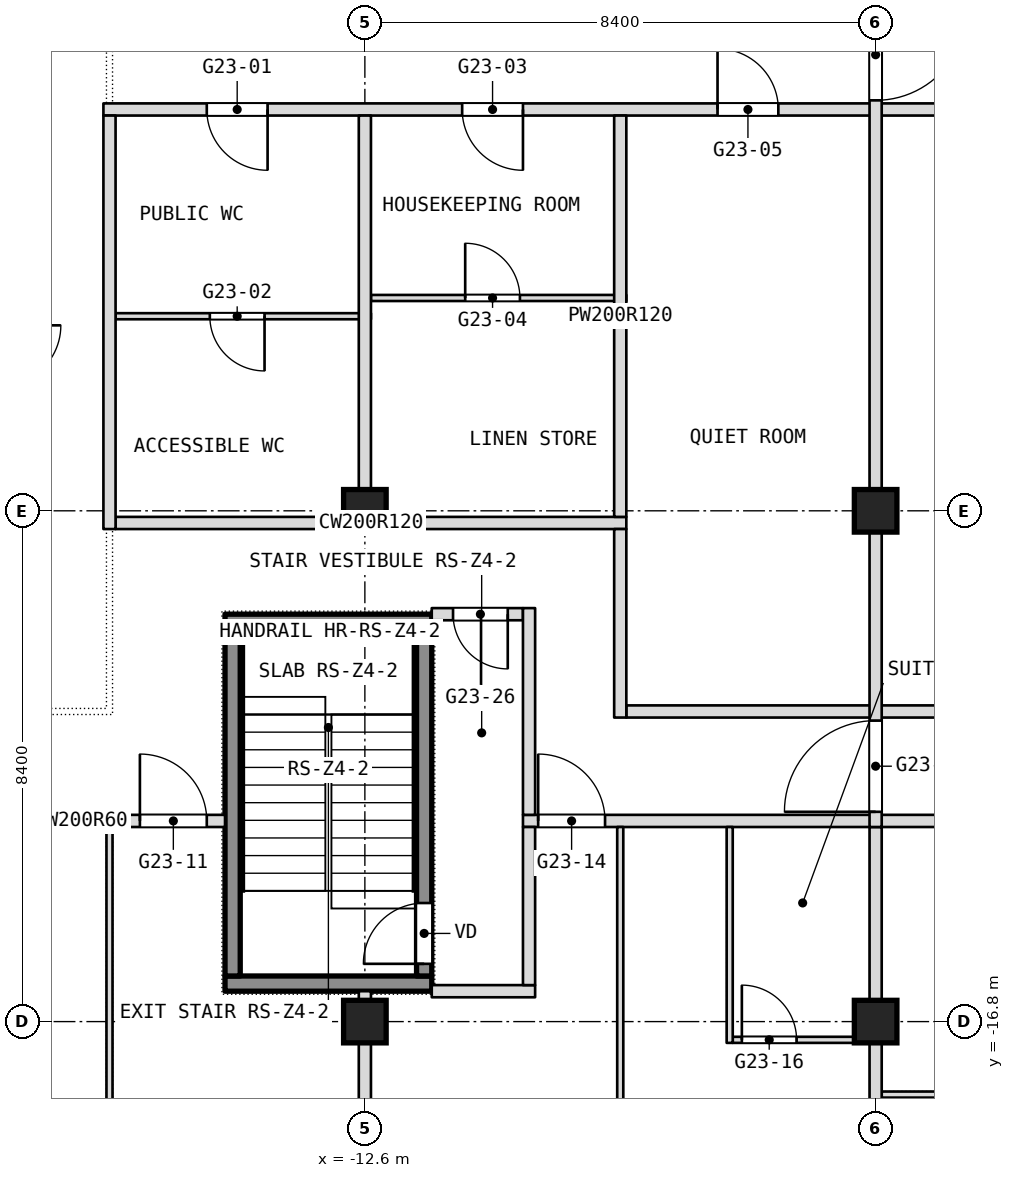
"""IFC4 building model, lengths in metres.
Left out: names, types, materials, properties, quantities, classifications, styles, units other than length and angle.
Written with IfcOpenShell. Run it as: python <this file> out.ifc"""

import sys

from ifc_helpers import new_model, si_unit, direction, frame, frame_2d, origin, origin_2d, place, context, subcontext, project, spatial, rectangle, extrude, element, fill, save


model = new_model("IFC4")
c1 = context("Model", 3, precision=1e-05, world=origin(), true_north=direction((0.0, 1.0)))
c2 = subcontext(c1, "Body", "Model", "MODEL_VIEW")
j1 = project(units=[si_unit("LENGTHUNIT", "METRE"), si_unit("PLANEANGLEUNIT", "RADIAN")], contexts=[c1])
p1 = place(None, origin())
s1 = spatial("IfcSite", under=j1, at=p1, CompositionType="ELEMENT")
p2 = place(p1, origin())
s2 = spatial("IfcBuilding", under=s1, at=p2, CompositionType="ELEMENT")
p3 = place(p2, frame((0.0, 0.0, 274.1)))
s3 = spatial("IfcBuildingStorey", under=s2, at=p3, CompositionType="ELEMENT", Elevation=274.1)
for number, where, z_axis, x_axis in (
    (1, (-12.6, -16.8, 0.0), (0.0, 0.0, 1.0), (1.0, 0.0, 0.0)),
    (2, (-12.6, -8.4, 0.0), (0.0, 0.0, 1.0), (1.0, 0.0, 0.0)),
    (3, (-4.2, -16.8, 0.0), (0.0, 0.0, 1.0), (1.0, 0.0, 0.0)),
    (4, (-4.2, -8.4, 0.0), (0.0, 0.0, 1.0), (1.0, 0.0, 0.0)),
):
    element("IfcColumn", number, at=place(p3, frame(where, z_axis=z_axis, x_axis=x_axis)), inside=s3, PredefinedType="COLUMN", context=c2, shape_type="SweptSolid", body=[
        extrude(rectangle(XDim=0.7, YDim=0.7, at=origin_2d()), origin(), (0.0, 0.0, 1.0), 3.6),
    ])
p4 = place(p3, frame((-4.1, -18.0, 0.0), z_axis=(0.0, 0.0, 1.0), x_axis=(1.0, 0.0, 0.0)))
e5 = element("IfcWall", 5, at=p4, inside=s3, PredefinedType="PARTITIONING", context=c2, shape_type="SweptSolid", body=[
    extrude(rectangle(XDim=3.55, YDim=0.1, at=frame_2d((1.775, 0.0))), origin(), (0.0, 0.0, 1.0), 3.34),
])
p5 = place(p3, frame((-6.55, -17.1, 0.0), z_axis=(0.0, 0.0, 1.0), x_axis=(1.0, 0.0, 0.0)))
e6 = element("IfcWall", 6, at=p5, inside=s3, PredefinedType="PARTITIONING", context=c2, shape_type="SweptSolid", body=[
    extrude(rectangle(XDim=2.45, YDim=0.1, at=frame_2d((1.225, 0.0))), origin(), (0.0, 0.0, 1.0), 3.34),
])
p6 = place(p5, frame((0.15, 0.0, 0.0)))
e7 = element("IfcOpeningElement", 7, at=p6, cuts=e6, PredefinedType="OPENING", context=c2, shape_type="SweptSolid", body=[
    extrude(rectangle(XDim=0.9, YDim=2.1, at=frame_2d((0.45, 1.05))), frame((0.0, 0.05, 0.0), z_axis=(0.0, -1.0, 0.0), x_axis=(1.0, 0.0, 0.0)), (0.0, 0.0, 1.0), 0.1),
])
p7 = place(p3, frame((-11.5, -16.3, 0.0), z_axis=(0.0, 0.0, 1.0), x_axis=(1.0, 0.0, 0.0)))
e8 = element("IfcWall", 8, at=p7, inside=s3, PredefinedType="PARTITIONING", context=c2, shape_type="SweptSolid", body=[
    extrude(rectangle(XDim=1.7, YDim=0.2, at=frame_2d((0.85, 0.0))), origin(), (0.0, 0.0, 1.0), 3.34),
])
p8 = place(p3, frame((-21.0, -13.5, 0.0), z_axis=(0.0, 0.0, 1.0), x_axis=(1.0, 0.0, 0.0)))
e9 = element("IfcWall", 9, at=p8, inside=s3, PredefinedType="PARTITIONING", context=c2, shape_type="SweptSolid", body=[
    extrude(rectangle(XDim=6.1, YDim=0.2, at=frame_2d((3.05, 0.0))), origin(), (0.0, 0.0, 1.0), 3.34),
])
p9 = place(p8, frame((4.7, 0.0, 0.0)))
e10 = element("IfcOpeningElement", 10, at=p9, cuts=e9, PredefinedType="OPENING", context=c2, shape_type="SweptSolid", body=[
    extrude(rectangle(XDim=1.1, YDim=2.1, at=frame_2d((0.55, 1.05))), frame((0.0, 0.1, 0.0), z_axis=(0.0, -1.0, 0.0), x_axis=(1.0, 0.0, 0.0)), (0.0, 0.0, 1.0), 0.2),
])
p10 = place(p3, frame((-10.0, -13.5, 0.0), z_axis=(0.0, 0.0, 1.0), x_axis=(1.0, 0.0, 0.0)))
e11 = element("IfcWall", 11, at=p10, inside=s3, PredefinedType="PARTITIONING", context=c2, shape_type="SweptSolid", body=[
    extrude(rectangle(XDim=16.0, YDim=0.2, at=frame_2d((8.0, 0.0))), origin(), (0.0, 0.0, 1.0), 3.34),
])
p11 = place(p10, frame((0.25, 0.0, 0.0)))
e12 = element("IfcOpeningElement", 12, at=p11, cuts=e11, PredefinedType="OPENING", context=c2, shape_type="SweptSolid", body=[
    extrude(rectangle(XDim=1.1, YDim=2.1, at=frame_2d((0.55, 1.05))), frame((0.0, 0.1, 0.0), z_axis=(0.0, -1.0, 0.0), x_axis=(1.0, 0.0, 0.0)), (0.0, 0.0, 1.0), 0.2),
])
p12 = place(p10, frame((9.5, 0.0, 0.0)))
e13 = element("IfcOpeningElement", 13, at=p12, cuts=e11, PredefinedType="OPENING", context=c2, shape_type="SweptSolid", body=[
    extrude(rectangle(XDim=1.1, YDim=2.1, at=frame_2d((0.55, 1.05))), frame((0.0, 0.1, 0.0), z_axis=(0.0, -1.0, 0.0), x_axis=(1.0, 0.0, 0.0)), (0.0, 0.0, 1.0), 0.2),
])
p13 = place(p3, frame((-8.3, -11.7, 0.0), z_axis=(0.0, 0.0, 1.0), x_axis=(1.0, 0.0, 0.0)))
e14 = element("IfcWall", 14, at=p13, inside=s3, PredefinedType="PARTITIONING", context=c2, shape_type="SweptSolid", body=[
    extrude(rectangle(XDim=25.0, YDim=0.2, at=frame_2d((12.5, 0.0))), origin(), (0.0, 0.0, 1.0), 3.34),
])
p14 = place(p3, frame((-11.5, -10.1, 0.0), z_axis=(0.0, 0.0, 1.0), x_axis=(1.0, 0.0, 0.0)))
e15 = element("IfcWall", 15, at=p14, inside=s3, PredefinedType="PARTITIONING", context=c2, shape_type="SweptSolid", body=[
    extrude(rectangle(XDim=1.5, YDim=0.2, at=frame_2d((0.75, 0.0))), origin(), (0.0, 0.0, 1.0), 3.34),
])
p15 = place(p14, frame((0.35, 0.0, 0.0)))
e16 = element("IfcOpeningElement", 16, at=p15, cuts=e15, PredefinedType="OPENING", context=c2, shape_type="SweptSolid", body=[
    extrude(rectangle(XDim=0.9, YDim=2.1, at=frame_2d((0.45, 1.05))), frame((0.0, 0.1, 0.0), z_axis=(0.0, -1.0, 0.0), x_axis=(1.0, 0.0, 0.0)), (0.0, 0.0, 1.0), 0.2),
])
p16 = place(p3, frame((-16.7, -8.6, 0.0), z_axis=(0.0, 0.0, 1.0), x_axis=(1.0, 0.0, 0.0)))
e17 = element("IfcWall", 17, at=p16, inside=s3, PredefinedType="PARTITIONING", context=c2, shape_type="SweptSolid", body=[
    extrude(rectangle(XDim=8.4, YDim=0.2, at=frame_2d((4.2, 0.0))), origin(), (0.0, 0.0, 1.0), 3.34),
])
p17 = place(p3, frame((-16.7, -5.2, 0.0), z_axis=(0.0, 0.0, 1.0), x_axis=(1.0, 0.0, 0.0)))
e18 = element("IfcWall", 18, at=p17, inside=s3, PredefinedType="PARTITIONING", context=c2, shape_type="SweptSolid", body=[
    extrude(rectangle(XDim=4.2, YDim=0.1, at=frame_2d((2.1, 0.0))), origin(), (0.0, 0.0, 1.0), 3.34),
])
p18 = place(p17, frame((1.55, 0.0, 0.0)))
e19 = element("IfcOpeningElement", 19, at=p18, cuts=e18, PredefinedType="OPENING", context=c2, shape_type="SweptSolid", body=[
    extrude(rectangle(XDim=0.9, YDim=2.1, at=frame_2d((0.45, 1.05))), frame((0.0, 0.05, 0.0), z_axis=(0.0, -1.0, 0.0), x_axis=(1.0, 0.0, 0.0)), (0.0, 0.0, 1.0), 0.1),
])
p19 = place(p3, frame((-12.5, -4.9, 0.0), z_axis=(0.0, 0.0, 1.0), x_axis=(1.0, 0.0, 0.0)))
e20 = element("IfcWall", 20, at=p19, inside=s3, PredefinedType="PARTITIONING", context=c2, shape_type="SweptSolid", body=[
    extrude(rectangle(XDim=4.2, YDim=0.1, at=frame_2d((2.1, 0.0))), origin(), (0.0, 0.0, 1.0), 3.34),
])
p20 = place(p19, frame((1.55, 0.0, 0.0)))
e21 = element("IfcOpeningElement", 21, at=p20, cuts=e20, PredefinedType="OPENING", context=c2, shape_type="SweptSolid", body=[
    extrude(rectangle(XDim=0.9, YDim=2.1, at=frame_2d((0.45, 1.05))), frame((0.0, 0.05, 0.0), z_axis=(0.0, -1.0, 0.0), x_axis=(1.0, 0.0, 0.0)), (0.0, 0.0, 1.0), 0.1),
])
p21 = place(p3, frame((-16.9, -1.8, 0.0), z_axis=(0.0, 0.0, 1.0), x_axis=(1.0, 0.0, 0.0)))
e22 = element("IfcWall", 22, at=p21, inside=s3, PredefinedType="PARTITIONING", context=c2, shape_type="SweptSolid", body=[
    extrude(rectangle(XDim=33.8, YDim=0.2, at=frame_2d((16.9, 0.0))), origin(), (0.0, 0.0, 1.0), 3.34),
])
p22 = place(p21, frame((1.7, 0.0, 0.0)))
e23 = element("IfcOpeningElement", 23, at=p22, cuts=e22, PredefinedType="OPENING", context=c2, shape_type="SweptSolid", body=[
    extrude(rectangle(XDim=1.0, YDim=2.1, at=frame_2d((0.5, 1.05))), frame((0.0, 0.1, 0.0), z_axis=(0.0, -1.0, 0.0), x_axis=(1.0, 0.0, 0.0)), (0.0, 0.0, 1.0), 0.2),
])
p23 = place(p21, frame((5.9, 0.0, 0.0)))
e24 = element("IfcOpeningElement", 24, at=p23, cuts=e22, PredefinedType="OPENING", context=c2, shape_type="SweptSolid", body=[
    extrude(rectangle(XDim=1.0, YDim=2.1, at=frame_2d((0.5, 1.05))), frame((0.0, 0.1, 0.0), z_axis=(0.0, -1.0, 0.0), x_axis=(1.0, 0.0, 0.0)), (0.0, 0.0, 1.0), 0.2),
])
p24 = place(p21, frame((10.1, 0.0, 0.0)))
e25 = element("IfcOpeningElement", 25, at=p24, cuts=e22, PredefinedType="OPENING", context=c2, shape_type="SweptSolid", body=[
    extrude(rectangle(XDim=1.0, YDim=2.1, at=frame_2d((0.5, 1.05))), frame((0.0, 0.1, 0.0), z_axis=(0.0, -1.0, 0.0), x_axis=(1.0, 0.0, 0.0)), (0.0, 0.0, 1.0), 0.2),
])
p25 = place(p21, frame((16.0, 0.0, 0.0)))
e26 = element("IfcOpeningElement", 26, at=p25, cuts=e22, PredefinedType="OPENING", context=c2, shape_type="SweptSolid", body=[
    extrude(rectangle(XDim=1.8, YDim=2.1, at=frame_2d((0.9, 1.05))), frame((0.0, 0.1, 0.0), z_axis=(0.0, -1.0, 0.0), x_axis=(1.0, 0.0, 0.0)), (0.0, 0.0, 1.0), 0.2),
])
p26 = place(p21, frame((22.7, 0.0, 0.0)))
e27 = element("IfcOpeningElement", 27, at=p26, cuts=e22, PredefinedType="OPENING", context=c2, shape_type="SweptSolid", body=[
    extrude(rectangle(XDim=1.0, YDim=2.1, at=frame_2d((0.5, 1.05))), frame((0.0, 0.1, 0.0), z_axis=(0.0, -1.0, 0.0), x_axis=(1.0, 0.0, 0.0)), (0.0, 0.0, 1.0), 0.2),
])
p27 = place(p21, frame((26.9, 0.0, 0.0)))
e28 = element("IfcOpeningElement", 28, at=p27, cuts=e22, PredefinedType="OPENING", context=c2, shape_type="SweptSolid", body=[
    extrude(rectangle(XDim=1.0, YDim=2.1, at=frame_2d((0.5, 1.05))), frame((0.0, 0.1, 0.0), z_axis=(0.0, -1.0, 0.0), x_axis=(1.0, 0.0, 0.0)), (0.0, 0.0, 1.0), 0.2),
])
p28 = place(p21, frame((31.1, 0.0, 0.0)))
e29 = element("IfcOpeningElement", 29, at=p28, cuts=e22, PredefinedType="OPENING", context=c2, shape_type="SweptSolid", body=[
    extrude(rectangle(XDim=1.0, YDim=2.1, at=frame_2d((0.5, 1.05))), frame((0.0, 0.1, 0.0), z_axis=(0.0, -1.0, 0.0), x_axis=(1.0, 0.0, 0.0)), (0.0, 0.0, 1.0), 0.2),
])
p29 = place(p3, frame((-4.2, -34.2, 0.0), z_axis=(0.0, 0.0, 1.0), x_axis=(0.0, 1.0, 0.0)))
e30 = element("IfcWall", 30, at=p29, inside=s3, PredefinedType="PARTITIONING", context=c2, shape_type="SweptSolid", body=[
    extrude(rectangle(XDim=20.6, YDim=0.2, at=frame_2d((10.3, 0.0))), origin(), (0.0, 0.0, 1.0), 3.34),
])
p30 = place(p3, frame((-4.2, -13.6, 0.0), z_axis=(0.0, 0.0, 1.0), x_axis=(0.0, 1.0, 0.0)))
e31 = element("IfcWall", 31, at=p30, inside=s3, PredefinedType="PARTITIONING", context=c2, shape_type="SweptSolid", body=[
    extrude(rectangle(XDim=13.6, YDim=0.2, at=frame_2d((6.8, 0.0))), origin(), (0.0, 0.0, 1.0), 3.34),
])
p31 = place(p30, frame((11.95, 0.0, 0.0)))
e32 = element("IfcOpeningElement", 32, at=p31, cuts=e31, PredefinedType="OPENING", context=c2, shape_type="SweptSolid", body=[
    extrude(rectangle(XDim=1.5, YDim=2.1, at=frame_2d((0.75, 1.05))), frame((0.0, 0.1, 0.0), z_axis=(0.0, -1.0, 0.0), x_axis=(1.0, 0.0, 0.0)), (0.0, 0.0, 1.0), 0.2),
])
p32 = place(p30, frame((0.25, 0.0, 0.0)))
e33 = element("IfcOpeningElement", 33, at=p32, cuts=e31, PredefinedType="OPENING", context=c2, shape_type="SweptSolid", body=[
    extrude(rectangle(XDim=1.5, YDim=2.1, at=frame_2d((0.75, 1.05))), frame((0.0, 0.1, 0.0), z_axis=(0.0, -1.0, 0.0), x_axis=(1.0, 0.0, 0.0)), (0.0, 0.0, 1.0), 0.2),
])
p33 = place(p3, frame((-6.6, -17.15, 0.0), z_axis=(0.0, 0.0, 1.0), x_axis=(0.0, 1.0, 0.0)))
e34 = element("IfcWall", 34, at=p33, inside=s3, PredefinedType="PARTITIONING", context=c2, shape_type="SweptSolid", body=[
    extrude(rectangle(XDim=3.55, YDim=0.1, at=frame_2d((1.775, 0.0))), origin(), (0.0, 0.0, 1.0), 3.34),
])
p34 = place(p3, frame((-8.4, -32.575, 0.0), z_axis=(0.0, 0.0, 1.0), x_axis=(0.0, 1.0, 0.0)))
e35 = element("IfcWall", 35, at=p34, inside=s3, PredefinedType="PARTITIONING", context=c2, shape_type="SweptSolid", body=[
    extrude(rectangle(XDim=18.975, YDim=0.1, at=frame_2d((9.487, 0.0))), origin(), (0.0, 0.0, 1.0), 3.34),
])
p35 = place(p34, frame((6.205, 0.0, 0.0)))
e36 = element("IfcOpeningElement", 36, at=p35, cuts=e35, PredefinedType="OPENING", context=c2, shape_type="SweptSolid", body=[
    extrude(rectangle(XDim=0.9, YDim=2.1, at=frame_2d((0.45, 1.05))), frame((0.0, 0.05, 0.0), z_axis=(0.0, -1.0, 0.0), x_axis=(1.0, 0.0, 0.0)), (0.0, 0.0, 1.0), 0.1),
])
p36 = place(p3, frame((-8.4, -11.8, 0.0), z_axis=(0.0, 0.0, 1.0), x_axis=(0.0, 1.0, 0.0)))
e37 = element("IfcWall", 37, at=p36, inside=s3, PredefinedType="PARTITIONING", context=c2, shape_type="SweptSolid", body=[
    extrude(rectangle(XDim=3.1, YDim=0.2, at=frame_2d((1.55, 0.0))), origin(), (0.0, 0.0, 1.0), 3.34),
])
p37 = place(p3, frame((-8.4, -8.5, 0.0), z_axis=(0.0, 0.0, 1.0), x_axis=(0.0, 1.0, 0.0)))
e38 = element("IfcWall", 38, at=p37, inside=s3, PredefinedType="PARTITIONING", context=c2, shape_type="SweptSolid", body=[
    extrude(rectangle(XDim=6.6, YDim=0.2, at=frame_2d((3.3, 0.0))), origin(), (0.0, 0.0, 1.0), 3.34),
])
p38 = place(p3, frame((-9.9, -16.2, 0.0), z_axis=(0.0, 0.0, 1.0), x_axis=(0.0, 1.0, 0.0)))
e39 = element("IfcWall", 39, at=p38, inside=s3, PredefinedType="PARTITIONING", context=c2, shape_type="SweptSolid", body=[
    extrude(rectangle(XDim=2.6, YDim=0.2, at=frame_2d((1.3, 0.0))), origin(), (0.0, 0.0, 1.0), 3.34),
])
p39 = place(p3, frame((-9.9, -13.4, 0.0), z_axis=(0.0, 0.0, 1.0), x_axis=(0.0, 1.0, 0.0)))
e40 = element("IfcWall", 40, at=p39, inside=s3, PredefinedType="PARTITIONING", context=c2, shape_type="SweptSolid", body=[
    extrude(rectangle(XDim=3.4, YDim=0.2, at=frame_2d((1.7, 0.0))), origin(), (0.0, 0.0, 1.0), 3.34),
])
p40 = place(p3, frame((-12.6, -33.075, 0.0), z_axis=(0.0, 0.0, 1.0), x_axis=(0.0, 1.0, 0.0)))
e41 = element("IfcWall", 41, at=p40, inside=s3, PredefinedType="PARTITIONING", context=c2, shape_type="SweptSolid", body=[
    extrude(rectangle(XDim=16.775, YDim=0.2, at=frame_2d((8.387, 0.0))), origin(), (0.0, 0.0, 1.0), 3.34),
])
p41 = place(p3, frame((-12.6, -8.5, 0.0), z_axis=(0.0, 0.0, 1.0), x_axis=(0.0, 1.0, 0.0)))
e42 = element("IfcWall", 42, at=p41, inside=s3, PredefinedType="PARTITIONING", context=c2, shape_type="SweptSolid", body=[
    extrude(rectangle(XDim=6.6, YDim=0.2, at=frame_2d((3.3, 0.0))), origin(), (0.0, 0.0, 1.0), 3.34),
])
p42 = place(p3, frame((-16.8, -31.957, 0.0), z_axis=(0.0, 0.0, 1.0), x_axis=(0.0, 1.0, 0.0)))
e43 = element("IfcWall", 43, at=p42, inside=s3, PredefinedType="PARTITIONING", context=c2, shape_type="SweptSolid", body=[
    extrude(rectangle(XDim=18.357, YDim=0.1, at=frame_2d((9.178, 0.0))), origin(), (0.0, 0.0, 1.0), 3.34),
])
p43 = place(p42, frame((6.59, 0.0, 0.0)))
e44 = element("IfcOpeningElement", 44, at=p43, cuts=e43, PredefinedType="OPENING", context=c2, shape_type="SweptSolid", body=[
    extrude(rectangle(XDim=0.9, YDim=2.1, at=frame_2d((0.45, 1.05))), frame((0.0, 0.05, 0.0), z_axis=(0.0, -1.0, 0.0), x_axis=(1.0, 0.0, 0.0)), (0.0, 0.0, 1.0), 0.1),
])
p44 = place(p3, frame((-16.8, -8.7, 0.0), z_axis=(0.0, 0.0, 1.0), x_axis=(0.0, 1.0, 0.0)))
e45 = element("IfcWall", 45, at=p44, inside=s3, PredefinedType="PARTITIONING", context=c2, shape_type="SweptSolid", body=[
    extrude(rectangle(XDim=6.8, YDim=0.2, at=frame_2d((3.4, 0.0))), origin(), (0.0, 0.0, 1.0), 3.34),
])
for number, where, z_axis, x_axis in (
    (46, (-14.9, -16.175, 0.1), (0.0, 0.0, 1.0), (1.0, 0.0, 0.0)),
    (47, (-14.9, -10.225, 0.1), (0.0, 0.0, 1.0), (1.0, 0.0, 0.0)),
):
    element("IfcWall", number, at=place(p3, frame(where, z_axis=z_axis, x_axis=x_axis)), inside=s3, PredefinedType="SHEAR", context=c2, shape_type="SweptSolid", body=[
        extrude(rectangle(XDim=3.4, YDim=0.25, at=frame_2d((1.7, 0.0))), origin(), (0.0, 0.0, 1.0), 3.6),
    ])
p45 = place(p3, frame((-14.775, -16.05, 0.1), z_axis=(0.0, 0.0, 1.0), x_axis=(0.0, 1.0, 0.0)))
e48 = element("IfcWall", 48, at=p45, inside=s3, PredefinedType="SHEAR", context=c2, shape_type="SweptSolid", body=[
    extrude(rectangle(XDim=5.7, YDim=0.25, at=frame_2d((2.85, 0.0))), origin(), (0.0, 0.0, 1.0), 3.6),
])
p46 = place(p3, frame((-11.625, -16.05, 0.1), z_axis=(0.0, 0.0, 1.0), x_axis=(0.0, 1.0, 0.0)))
e49 = element("IfcWall", 49, at=p46, inside=s3, PredefinedType="SHEAR", context=c2, shape_type="SweptSolid", body=[
    extrude(rectangle(XDim=5.7, YDim=0.25, at=frame_2d((2.85, 0.0))), origin(), (0.0, 0.0, 1.0), 3.6),
])
p47 = place(p46, frame((0.2, 0.0, 0.0)))
e50 = element("IfcOpeningElement", 50, at=p47, cuts=e49, PredefinedType="OPENING", context=c2, shape_type="SweptSolid", body=[
    extrude(rectangle(XDim=1.0, YDim=2.1, at=frame_2d((0.5, 1.05))), frame((0.0, 0.125, 0.0), z_axis=(0.0, -1.0, 0.0), x_axis=(1.0, 0.0, 0.0)), (0.0, 0.0, 1.0), 0.25),
])
p48 = place(p6, origin())
e51 = element("IfcDoor", 51, at=p48, inside=s3, OperationType="SINGLE_SWING_LEFT", PredefinedType="DOOR", context=c2, shape_type="SweptSolid", body=[
    extrude(rectangle(XDim=0.9, YDim=2.1, at=frame_2d((0.45, 1.05))), frame((0.0, 0.025, 0.0), z_axis=(0.0, -1.0, 0.0), x_axis=(1.0, 0.0, 0.0)), (0.0, 0.0, 1.0), 0.05),
])
fill(e7, e51)
p49 = place(p9, origin())
e52 = element("IfcDoor", 52, at=p49, inside=s3, OperationType="SINGLE_SWING_RIGHT", PredefinedType="DOOR", context=c2, shape_type="SweptSolid", body=[
    extrude(rectangle(XDim=1.1, YDim=2.1, at=frame_2d((0.55, 1.05))), frame((0.0, 0.025, 0.0), z_axis=(0.0, -1.0, 0.0), x_axis=(1.0, 0.0, 0.0)), (0.0, 0.0, 1.0), 0.05),
])
fill(e10, e52)
p50 = place(p11, origin())
e53 = element("IfcDoor", 53, at=p50, inside=s3, OperationType="SINGLE_SWING_RIGHT", PredefinedType="DOOR", context=c2, shape_type="SweptSolid", body=[
    extrude(rectangle(XDim=1.1, YDim=2.1, at=frame_2d((0.55, 1.05))), frame((0.0, 0.025, 0.0), z_axis=(0.0, -1.0, 0.0), x_axis=(1.0, 0.0, 0.0)), (0.0, 0.0, 1.0), 0.05),
])
fill(e12, e53)
p51 = place(p15, origin())
e54 = element("IfcDoor", 54, at=p51, inside=s3, OperationType="SINGLE_SWING_LEFT", PredefinedType="DOOR", context=c2, shape_type="SweptSolid", body=[
    extrude(rectangle(XDim=0.9, YDim=2.1, at=frame_2d((0.45, 1.05))), frame((0.0, 0.025, 0.0), z_axis=(0.0, -1.0, 0.0), x_axis=(1.0, 0.0, 0.0)), (0.0, 0.0, 1.0), 0.05),
])
fill(e16, e54)
p52 = place(p18, origin())
e55 = element("IfcDoor", 55, at=p52, inside=s3, OperationType="SINGLE_SWING_RIGHT", PredefinedType="DOOR", context=c2, shape_type="SweptSolid", body=[
    extrude(rectangle(XDim=0.9, YDim=2.1, at=frame_2d((0.45, 1.05))), frame((0.0, 0.025, 0.0), z_axis=(0.0, -1.0, 0.0), x_axis=(1.0, 0.0, 0.0)), (0.0, 0.0, 1.0), 0.05),
])
fill(e19, e55)
p53 = place(p20, origin())
e56 = element("IfcDoor", 56, at=p53, inside=s3, OperationType="SINGLE_SWING_RIGHT", PredefinedType="DOOR", context=c2, shape_type="SweptSolid", body=[
    extrude(rectangle(XDim=0.9, YDim=2.1, at=frame_2d((0.45, 1.05))), frame((0.0, 0.025, 0.0), z_axis=(0.0, -1.0, 0.0), x_axis=(1.0, 0.0, 0.0)), (0.0, 0.0, 1.0), 0.05),
])
fill(e21, e56)
p54 = place(p22, origin())
e57 = element("IfcDoor", 57, at=p54, inside=s3, OperationType="SINGLE_SWING_LEFT", PredefinedType="DOOR", context=c2, shape_type="SweptSolid", body=[
    extrude(rectangle(XDim=1.0, YDim=2.1, at=frame_2d((0.5, 1.05))), frame((0.0, 0.025, 0.0), z_axis=(0.0, -1.0, 0.0), x_axis=(1.0, 0.0, 0.0)), (0.0, 0.0, 1.0), 0.05),
])
fill(e23, e57)
p55 = place(p23, origin())
e58 = element("IfcDoor", 58, at=p55, inside=s3, OperationType="SINGLE_SWING_LEFT", PredefinedType="DOOR", context=c2, shape_type="SweptSolid", body=[
    extrude(rectangle(XDim=1.0, YDim=2.1, at=frame_2d((0.5, 1.05))), frame((0.0, 0.025, 0.0), z_axis=(0.0, -1.0, 0.0), x_axis=(1.0, 0.0, 0.0)), (0.0, 0.0, 1.0), 0.05),
])
fill(e24, e58)
p56 = place(p24, origin())
e59 = element("IfcDoor", 59, at=p56, inside=s3, OperationType="SINGLE_SWING_RIGHT", PredefinedType="DOOR", context=c2, shape_type="SweptSolid", body=[
    extrude(rectangle(XDim=1.0, YDim=2.1, at=frame_2d((0.5, 1.05))), frame((0.0, 0.025, 0.0), z_axis=(0.0, -1.0, 0.0), x_axis=(1.0, 0.0, 0.0)), (0.0, 0.0, 1.0), 0.05),
])
fill(e25, e59)
p57 = place(p47, origin())
e60 = element("IfcDoor", 60, at=p57, inside=s3, OperationType="SINGLE_SWING_LEFT", PredefinedType="DOOR", context=c2, shape_type="SweptSolid", body=[
    extrude(rectangle(XDim=1.0, YDim=2.1, at=frame_2d((0.5, 1.05))), frame((0.0, 0.025, 0.0), z_axis=(0.0, -1.0, 0.0), x_axis=(1.0, 0.0, 0.0)), (0.0, 0.0, 1.0), 0.05),
])
fill(e50, e60)
p58 = place(p31, origin())
e61 = element("IfcDoor", 61, at=p58, inside=s3, OperationType="DOUBLE_DOOR_DOUBLE_SWING", PredefinedType="DOOR", context=c2, shape_type="SweptSolid", body=[
    extrude(rectangle(XDim=1.5, YDim=2.1, at=frame_2d((0.75, 1.05))), frame((0.0, 0.025, 0.0), z_axis=(0.0, -1.0, 0.0), x_axis=(1.0, 0.0, 0.0)), (0.0, 0.0, 1.0), 0.05),
])
fill(e32, e61)
p59 = place(p32, origin())
e62 = element("IfcDoor", 62, at=p59, inside=s3, OperationType="DOUBLE_DOOR_DOUBLE_SWING", PredefinedType="DOOR", context=c2, shape_type="SweptSolid", body=[
    extrude(rectangle(XDim=1.5, YDim=2.1, at=frame_2d((0.75, 1.05))), frame((0.0, 0.025, 0.0), z_axis=(0.0, -1.0, 0.0), x_axis=(1.0, 0.0, 0.0)), (0.0, 0.0, 1.0), 0.05),
])
fill(e33, e62)
save(model, sys.argv[1])
